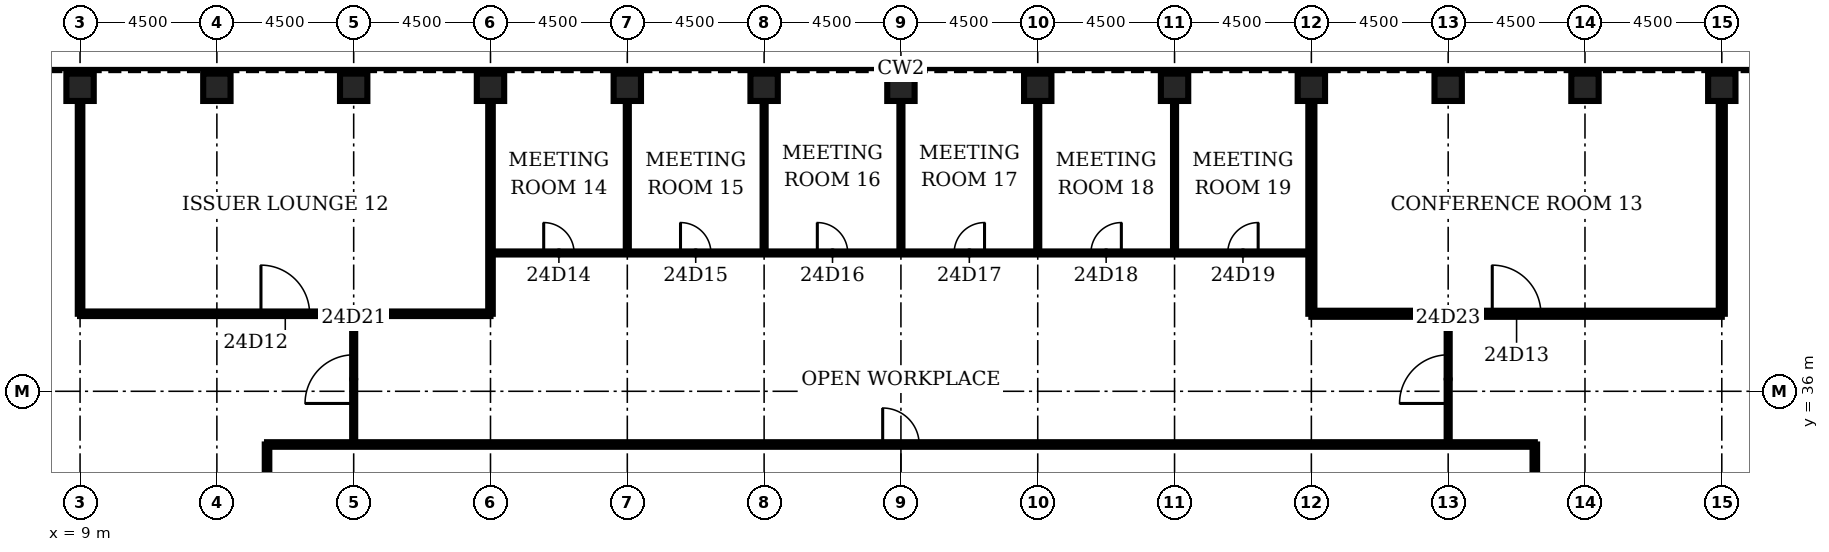
"""IFC4 building model, lengths in metres.
Left out: names, types, materials, properties, quantities, classifications, styles, units other than length and angle.
Written with IfcOpenShell. Run it as: python <this file> out.ifc"""

import sys

from ifc_helpers import new_model, si_unit, direction, frame, frame_2d, origin, origin_2d, place, context, subcontext, project, spatial, rectangle, hollow_rectangle, extrude, element, fill, save


model = new_model("IFC4")
c1 = context("Model", 3, precision=1e-05, world=origin(), true_north=direction((0.0, 1.0)))
c2 = subcontext(c1, "Body", "Model", "MODEL_VIEW")
j1 = project(units=[si_unit("LENGTHUNIT", "METRE"), si_unit("PLANEANGLEUNIT", "RADIAN")], contexts=[c1])
p1 = place(None, origin())
s1 = spatial("IfcSite", under=j1, at=p1, CompositionType="ELEMENT")
p2 = place(p1, origin())
s2 = spatial("IfcBuilding", under=s1, at=p2, CompositionType="ELEMENT")
p3 = place(p2, frame((0.0, 0.0, 113.1)))
s3 = spatial("IfcBuildingStorey", under=s2, at=p3, CompositionType="ELEMENT", Elevation=113.1)
for number, where, z_axis, x_axis in (
    (1, (63.0, 46.0, 0.0), (0.0, 0.0, 1.0), (0.0, 1.0, 0.0)),
    (2, (58.5, 46.0, 0.0), (0.0, 0.0, 1.0), (0.0, 1.0, 0.0)),
    (3, (54.0, 46.0, 0.0), (0.0, 0.0, 1.0), (0.0, 1.0, 0.0)),
    (4, (49.5, 46.0, 0.0), (0.0, 0.0, 1.0), (0.0, 1.0, 0.0)),
    (5, (45.0, 46.0, 0.0), (0.0, 0.0, 1.0), (0.0, 1.0, 0.0)),
    (6, (40.5, 46.0, 0.0), (0.0, 0.0, 1.0), (0.0, 1.0, 0.0)),
    (7, (36.0, 46.0, 0.0), (0.0, 0.0, 1.0), (0.0, 1.0, 0.0)),
    (8, (31.5, 46.0, 0.0), (0.0, 0.0, 1.0), (0.0, 1.0, 0.0)),
    (9, (27.0, 46.0, 0.0), (0.0, 0.0, 1.0), (0.0, 1.0, 0.0)),
    (10, (22.5, 46.0, 0.0), (0.0, 0.0, 1.0), (0.0, 1.0, 0.0)),
    (11, (18.0, 46.0, 0.0), (0.0, 0.0, 1.0), (0.0, 1.0, 0.0)),
    (12, (13.5, 46.0, 0.0), (0.0, 0.0, 1.0), (0.0, 1.0, 0.0)),
    (13, (9.0, 46.0, 0.0), (0.0, 0.0, 1.0), (0.0, 1.0, 0.0)),
):
    element("IfcColumn", number, at=place(p3, frame(where, z_axis=z_axis, x_axis=x_axis)), inside=s3, PredefinedType="COLUMN", context=c2, shape_type="SweptSolid", body=[
        extrude(hollow_rectangle(XDim=0.9, YDim=0.9, WallThickness=0.11, at=origin_2d()), origin(), (0.0, 0.0, 1.0), 4.2),
    ])
p4 = place(p3, frame((15.15, 34.25, 0.0), z_axis=(0.0, 0.0, 1.0), x_axis=(1.0, 0.0, 0.0)))
e14 = element("IfcWall", 14, at=p4, inside=s3, PredefinedType="PARTITIONING", context=c2, shape_type="SweptSolid", body=[
    extrude(rectangle(XDim=41.7, YDim=0.15, at=frame_2d((20.85, 0.0))), origin(), (0.0, 0.0, 1.0), 3.0),
])
p5 = place(p4, frame((20.25, 0.0, 0.0)))
e15 = element("IfcOpeningElement", 15, at=p5, cuts=e14, PredefinedType="OPENING", context=c2, shape_type="SweptSolid", body=[
    extrude(rectangle(XDim=1.2, YDim=2.1, at=frame_2d((0.6, 1.05))), frame((0.0, 0.085, 0.0), z_axis=(0.0, -1.0, 0.0), x_axis=(1.0, 0.0, 0.0)), (0.0, 0.0, 1.0), 0.17),
])
p6 = place(p3, frame((9.0, 38.55, 0.0), z_axis=(0.0, 0.0, 1.0), x_axis=(1.0, 0.0, 0.0)))
e16 = element("IfcWall", 16, at=p6, inside=s3, PredefinedType="PARTITIONING", context=c2, shape_type="SweptSolid", body=[
    extrude(rectangle(XDim=13.5, YDim=0.15, at=frame_2d((6.75, 0.0))), origin(), (0.0, 0.0, 1.0), 3.0),
])
p7 = place(p6, frame((5.95, 0.0, 0.0)))
e17 = element("IfcOpeningElement", 17, at=p7, cuts=e16, PredefinedType="OPENING", context=c2, shape_type="SweptSolid", body=[
    extrude(rectangle(XDim=1.6, YDim=2.1, at=frame_2d((0.8, 1.05))), frame((0.0, 0.085, 0.0), z_axis=(0.0, -1.0, 0.0), x_axis=(1.0, 0.0, 0.0)), (0.0, 0.0, 1.0), 0.17),
])
p8 = place(p3, frame((49.5, 38.55, 0.0), z_axis=(0.0, 0.0, 1.0), x_axis=(1.0, 0.0, 0.0)))
e18 = element("IfcWall", 18, at=p8, inside=s3, PredefinedType="PARTITIONING", context=c2, shape_type="SweptSolid", body=[
    extrude(rectangle(XDim=13.5, YDim=0.2, at=frame_2d((6.75, 0.0))), origin(), (0.0, 0.0, 1.0), 3.0),
])
p9 = place(p8, frame((5.95, 0.0, 0.0)))
e19 = element("IfcOpeningElement", 19, at=p9, cuts=e18, PredefinedType="OPENING", context=c2, shape_type="SweptSolid", body=[
    extrude(rectangle(XDim=1.6, YDim=2.1, at=frame_2d((0.8, 1.05))), frame((0.0, 0.11, 0.0), z_axis=(0.0, -1.0, 0.0), x_axis=(1.0, 0.0, 0.0)), (0.0, 0.0, 1.0), 0.22),
])
p10 = place(p3, frame((22.5, 40.55, 0.0), z_axis=(0.0, 0.0, 1.0), x_axis=(1.0, 0.0, 0.0)))
e20 = element("IfcWall", 20, at=p10, inside=s3, PredefinedType="PARTITIONING", context=c2, shape_type="SweptSolid", body=[
    extrude(rectangle(XDim=27.0, YDim=0.1, at=frame_2d((13.5, 0.0))), origin(), (0.0, 0.0, 1.0), 3.0),
])
p11 = place(p10, frame((1.75, 0.0, 0.0)))
e21 = element("IfcOpeningElement", 21, at=p11, cuts=e20, PredefinedType="OPENING", context=c2, shape_type="SweptSolid", body=[
    extrude(rectangle(XDim=1.0, YDim=2.1, at=frame_2d((0.5, 1.05))), frame((0.0, 0.06, 0.0), z_axis=(0.0, -1.0, 0.0), x_axis=(1.0, 0.0, 0.0)), (0.0, 0.0, 1.0), 0.12),
])
p12 = place(p10, frame((6.25, 0.0, 0.0)))
e22 = element("IfcOpeningElement", 22, at=p12, cuts=e20, PredefinedType="OPENING", context=c2, shape_type="SweptSolid", body=[
    extrude(rectangle(XDim=1.0, YDim=2.1, at=frame_2d((0.5, 1.05))), frame((0.0, 0.06, 0.0), z_axis=(0.0, -1.0, 0.0), x_axis=(1.0, 0.0, 0.0)), (0.0, 0.0, 1.0), 0.12),
])
p13 = place(p10, frame((10.75, 0.0, 0.0)))
e23 = element("IfcOpeningElement", 23, at=p13, cuts=e20, PredefinedType="OPENING", context=c2, shape_type="SweptSolid", body=[
    extrude(rectangle(XDim=1.0, YDim=2.1, at=frame_2d((0.5, 1.05))), frame((0.0, 0.06, 0.0), z_axis=(0.0, -1.0, 0.0), x_axis=(1.0, 0.0, 0.0)), (0.0, 0.0, 1.0), 0.12),
])
p14 = place(p10, frame((15.25, 0.0, 0.0)))
e24 = element("IfcOpeningElement", 24, at=p14, cuts=e20, PredefinedType="OPENING", context=c2, shape_type="SweptSolid", body=[
    extrude(rectangle(XDim=1.0, YDim=2.1, at=frame_2d((0.5, 1.05))), frame((0.0, 0.06, 0.0), z_axis=(0.0, -1.0, 0.0), x_axis=(1.0, 0.0, 0.0)), (0.0, 0.0, 1.0), 0.12),
])
p15 = place(p10, frame((19.75, 0.0, 0.0)))
e25 = element("IfcOpeningElement", 25, at=p15, cuts=e20, PredefinedType="OPENING", context=c2, shape_type="SweptSolid", body=[
    extrude(rectangle(XDim=1.0, YDim=2.1, at=frame_2d((0.5, 1.05))), frame((0.0, 0.06, 0.0), z_axis=(0.0, -1.0, 0.0), x_axis=(1.0, 0.0, 0.0)), (0.0, 0.0, 1.0), 0.12),
])
p16 = place(p10, frame((24.25, 0.0, 0.0)))
e26 = element("IfcOpeningElement", 26, at=p16, cuts=e20, PredefinedType="OPENING", context=c2, shape_type="SweptSolid", body=[
    extrude(rectangle(XDim=1.0, YDim=2.1, at=frame_2d((0.5, 1.05))), frame((0.0, 0.06, 0.0), z_axis=(0.0, -1.0, 0.0), x_axis=(1.0, 0.0, 0.0)), (0.0, 0.0, 1.0), 0.12),
])
p17 = place(p3, frame((9.0, 38.55, 0.0), z_axis=(0.0, 0.0, 1.0), x_axis=(0.0, 1.0, 0.0)))
e27 = element("IfcWall", 27, at=p17, inside=s3, PredefinedType="PARTITIONING", context=c2, shape_type="SweptSolid", body=[
    extrude(rectangle(XDim=7.0, YDim=0.15, at=frame_2d((3.5, 0.0))), origin(), (0.0, 0.0, 1.0), 3.0),
])
p18 = place(p3, frame((15.15, 13.75, 0.0), z_axis=(0.0, 0.0, 1.0), x_axis=(0.0, 1.0, 0.0)))
e28 = element("IfcWall", 28, at=p18, inside=s3, PredefinedType="PARTITIONING", context=c2, shape_type="SweptSolid", body=[
    extrude(rectangle(XDim=20.5, YDim=0.15, at=frame_2d((10.25, 0.0))), origin(), (0.0, 0.0, 1.0), 3.0),
])
p19 = place(p18, frame((9.65, 0.0, 0.0)))
e29 = element("IfcOpeningElement", 29, at=p19, cuts=e28, PredefinedType="OPENING", context=c2, shape_type="SweptSolid", body=[
    extrude(rectangle(XDim=1.2, YDim=2.1, at=frame_2d((0.6, 1.05))), frame((0.0, 0.085, 0.0), z_axis=(0.0, -1.0, 0.0), x_axis=(1.0, 0.0, 0.0)), (0.0, 0.0, 1.0), 0.17),
])
p20 = place(p3, frame((18.0, 34.25, 0.0), z_axis=(0.0, 0.0, 1.0), x_axis=(0.0, 1.0, 0.0)))
e30 = element("IfcWall", 30, at=p20, inside=s3, PredefinedType="PARTITIONING", context=c2, shape_type="SweptSolid", body=[
    extrude(rectangle(XDim=4.3, YDim=0.1, at=frame_2d((2.15, 0.0))), origin(), (0.0, 0.0, 1.0), 3.0),
])
p21 = place(p20, frame((1.35, 0.0, 0.0)))
e31 = element("IfcOpeningElement", 31, at=p21, cuts=e30, PredefinedType="OPENING", context=c2, shape_type="SweptSolid", body=[
    extrude(rectangle(XDim=1.6, YDim=2.1, at=frame_2d((0.8, 1.05))), frame((0.0, 0.06, 0.0), z_axis=(0.0, -1.0, 0.0), x_axis=(1.0, 0.0, 0.0)), (0.0, 0.0, 1.0), 0.12),
])
p22 = place(p3, frame((22.5, 38.55, 0.0), z_axis=(0.0, 0.0, 1.0), x_axis=(0.0, 1.0, 0.0)))
e32 = element("IfcWall", 32, at=p22, inside=s3, PredefinedType="PARTITIONING", context=c2, shape_type="SweptSolid", body=[
    extrude(rectangle(XDim=7.0, YDim=0.15, at=frame_2d((3.5, 0.0))), origin(), (0.0, 0.0, 1.0), 3.0),
])
for number, where, z_axis, x_axis in (
    (33, (27.0, 40.55, 0.0), (0.0, 0.0, 1.0), (0.0, 1.0, 0.0)),
    (34, (31.5, 40.55, 0.0), (0.0, 0.0, 1.0), (0.0, 1.0, 0.0)),
    (35, (36.0, 40.55, 0.0), (0.0, 0.0, 1.0), (0.0, 1.0, 0.0)),
    (36, (40.5, 40.55, 0.0), (0.0, 0.0, 1.0), (0.0, 1.0, 0.0)),
    (37, (45.0, 40.55, 0.0), (0.0, 0.0, 1.0), (0.0, 1.0, 0.0)),
):
    element("IfcWall", number, at=place(p3, frame(where, z_axis=z_axis, x_axis=x_axis)), inside=s3, PredefinedType="PARTITIONING", context=c2, shape_type="SweptSolid", body=[
        extrude(rectangle(XDim=5.0, YDim=0.1, at=frame_2d((2.5, 0.0))), origin(), (0.0, 0.0, 1.0), 3.0),
    ])
p23 = place(p3, frame((49.5, 38.55, 0.0), z_axis=(0.0, 0.0, 1.0), x_axis=(0.0, 1.0, 0.0)))
e38 = element("IfcWall", 38, at=p23, inside=s3, PredefinedType="PARTITIONING", context=c2, shape_type="SweptSolid", body=[
    extrude(rectangle(XDim=7.0, YDim=0.2, at=frame_2d((3.5, 0.0))), origin(), (0.0, 0.0, 1.0), 3.0),
])
p24 = place(p3, frame((54.0, 34.25, 0.0), z_axis=(0.0, 0.0, 1.0), x_axis=(0.0, 1.0, 0.0)))
e39 = element("IfcWall", 39, at=p24, inside=s3, PredefinedType="PARTITIONING", context=c2, shape_type="SweptSolid", body=[
    extrude(rectangle(XDim=4.3, YDim=0.1, at=frame_2d((2.15, 0.0))), origin(), (0.0, 0.0, 1.0), 3.0),
])
p25 = place(p24, frame((1.35, 0.0, 0.0)))
e40 = element("IfcOpeningElement", 40, at=p25, cuts=e39, PredefinedType="OPENING", context=c2, shape_type="SweptSolid", body=[
    extrude(rectangle(XDim=1.6, YDim=2.1, at=frame_2d((0.8, 1.05))), frame((0.0, 0.06, 0.0), z_axis=(0.0, -1.0, 0.0), x_axis=(1.0, 0.0, 0.0)), (0.0, 0.0, 1.0), 0.12),
])
p26 = place(p3, frame((56.85, 13.75, 0.0), z_axis=(0.0, 0.0, 1.0), x_axis=(0.0, 1.0, 0.0)))
e41 = element("IfcWall", 41, at=p26, inside=s3, PredefinedType="PARTITIONING", context=c2, shape_type="SweptSolid", body=[
    extrude(rectangle(XDim=20.5, YDim=0.15, at=frame_2d((10.25, 0.0))), origin(), (0.0, 0.0, 1.0), 3.0),
])
p27 = place(p26, frame((9.65, 0.0, 0.0)))
e42 = element("IfcOpeningElement", 42, at=p27, cuts=e41, PredefinedType="OPENING", context=c2, shape_type="SweptSolid", body=[
    extrude(rectangle(XDim=1.2, YDim=2.1, at=frame_2d((0.6, 1.05))), frame((0.0, 0.085, 0.0), z_axis=(0.0, -1.0, 0.0), x_axis=(1.0, 0.0, 0.0)), (0.0, 0.0, 1.0), 0.17),
])
p28 = place(p3, frame((63.0, 38.55, 0.0), z_axis=(0.0, 0.0, 1.0), x_axis=(0.0, 1.0, 0.0)))
e43 = element("IfcWall", 43, at=p28, inside=s3, PredefinedType="PARTITIONING", context=c2, shape_type="SweptSolid", body=[
    extrude(rectangle(XDim=7.0, YDim=0.2, at=frame_2d((3.5, 0.0))), origin(), (0.0, 0.0, 1.0), 3.0),
])
p29 = place(p7, origin())
e44 = element("IfcDoor", 44, at=p29, inside=s3, OperationType="SINGLE_SWING_LEFT", PredefinedType="DOOR", context=c2, shape_type="SweptSolid", body=[
    extrude(rectangle(XDim=1.6, YDim=2.1, at=frame_2d((0.8, 1.05))), frame((0.0, 0.025, 0.0), z_axis=(0.0, -1.0, 0.0), x_axis=(1.0, 0.0, 0.0)), (0.0, 0.0, 1.0), 0.05),
])
fill(e17, e44)
p30 = place(p9, origin())
e45 = element("IfcDoor", 45, at=p30, inside=s3, OperationType="SINGLE_SWING_LEFT", PredefinedType="DOOR", context=c2, shape_type="SweptSolid", body=[
    extrude(rectangle(XDim=1.6, YDim=2.1, at=frame_2d((0.8, 1.05))), frame((0.0, 0.025, 0.0), z_axis=(0.0, -1.0, 0.0), x_axis=(1.0, 0.0, 0.0)), (0.0, 0.0, 1.0), 0.05),
])
fill(e19, e45)
p31 = place(p11, origin())
e46 = element("IfcDoor", 46, at=p31, inside=s3, OperationType="SINGLE_SWING_LEFT", PredefinedType="DOOR", context=c2, shape_type="SweptSolid", body=[
    extrude(rectangle(XDim=1.0, YDim=2.1, at=frame_2d((0.5, 1.05))), frame((0.0, 0.025, 0.0), z_axis=(0.0, -1.0, 0.0), x_axis=(1.0, 0.0, 0.0)), (0.0, 0.0, 1.0), 0.05),
])
fill(e21, e46)
p32 = place(p12, origin())
e47 = element("IfcDoor", 47, at=p32, inside=s3, OperationType="SINGLE_SWING_LEFT", PredefinedType="DOOR", context=c2, shape_type="SweptSolid", body=[
    extrude(rectangle(XDim=1.0, YDim=2.1, at=frame_2d((0.5, 1.05))), frame((0.0, 0.025, 0.0), z_axis=(0.0, -1.0, 0.0), x_axis=(1.0, 0.0, 0.0)), (0.0, 0.0, 1.0), 0.05),
])
fill(e22, e47)
p33 = place(p13, origin())
e48 = element("IfcDoor", 48, at=p33, inside=s3, OperationType="SINGLE_SWING_LEFT", PredefinedType="DOOR", context=c2, shape_type="SweptSolid", body=[
    extrude(rectangle(XDim=1.0, YDim=2.1, at=frame_2d((0.5, 1.05))), frame((0.0, 0.025, 0.0), z_axis=(0.0, -1.0, 0.0), x_axis=(1.0, 0.0, 0.0)), (0.0, 0.0, 1.0), 0.05),
])
fill(e23, e48)
p34 = place(p14, origin())
e49 = element("IfcDoor", 49, at=p34, inside=s3, OperationType="SINGLE_SWING_RIGHT", PredefinedType="DOOR", context=c2, shape_type="SweptSolid", body=[
    extrude(rectangle(XDim=1.0, YDim=2.1, at=frame_2d((0.5, 1.05))), frame((0.0, 0.025, 0.0), z_axis=(0.0, -1.0, 0.0), x_axis=(1.0, 0.0, 0.0)), (0.0, 0.0, 1.0), 0.05),
])
fill(e24, e49)
p35 = place(p15, origin())
e50 = element("IfcDoor", 50, at=p35, inside=s3, OperationType="SINGLE_SWING_RIGHT", PredefinedType="DOOR", context=c2, shape_type="SweptSolid", body=[
    extrude(rectangle(XDim=1.0, YDim=2.1, at=frame_2d((0.5, 1.05))), frame((0.0, 0.025, 0.0), z_axis=(0.0, -1.0, 0.0), x_axis=(1.0, 0.0, 0.0)), (0.0, 0.0, 1.0), 0.05),
])
fill(e25, e50)
p36 = place(p16, origin())
e51 = element("IfcDoor", 51, at=p36, inside=s3, OperationType="SINGLE_SWING_RIGHT", PredefinedType="DOOR", context=c2, shape_type="SweptSolid", body=[
    extrude(rectangle(XDim=1.0, YDim=2.1, at=frame_2d((0.5, 1.05))), frame((0.0, 0.025, 0.0), z_axis=(0.0, -1.0, 0.0), x_axis=(1.0, 0.0, 0.0)), (0.0, 0.0, 1.0), 0.05),
])
fill(e26, e51)
p37 = place(p21, origin())
e52 = element("IfcDoor", 52, at=p37, inside=s3, OperationType="SINGLE_SWING_LEFT", PredefinedType="DOOR", context=c2, shape_type="SweptSolid", body=[
    extrude(rectangle(XDim=1.6, YDim=2.1, at=frame_2d((0.8, 1.05))), frame((0.0, 0.025, 0.0), z_axis=(0.0, -1.0, 0.0), x_axis=(1.0, 0.0, 0.0)), (0.0, 0.0, 1.0), 0.05),
])
fill(e31, e52)
p38 = place(p25, origin())
e53 = element("IfcDoor", 53, at=p38, inside=s3, OperationType="SINGLE_SWING_LEFT", PredefinedType="DOOR", context=c2, shape_type="SweptSolid", body=[
    extrude(rectangle(XDim=1.6, YDim=2.1, at=frame_2d((0.8, 1.05))), frame((0.0, 0.025, 0.0), z_axis=(0.0, -1.0, 0.0), x_axis=(1.0, 0.0, 0.0)), (0.0, 0.0, 1.0), 0.05),
])
fill(e40, e53)
p39 = place(p5, origin())
e54 = element("IfcDoor", 54, at=p39, inside=s3, OperationType="SINGLE_SWING_LEFT", PredefinedType="DOOR", context=c2, shape_type="SweptSolid", body=[
    extrude(rectangle(XDim=1.2, YDim=2.1, at=frame_2d((0.6, 1.05))), frame((0.0, 0.025, 0.0), z_axis=(0.0, -1.0, 0.0), x_axis=(1.0, 0.0, 0.0)), (0.0, 0.0, 1.0), 0.05),
])
fill(e15, e54)
save(model, sys.argv[1])
